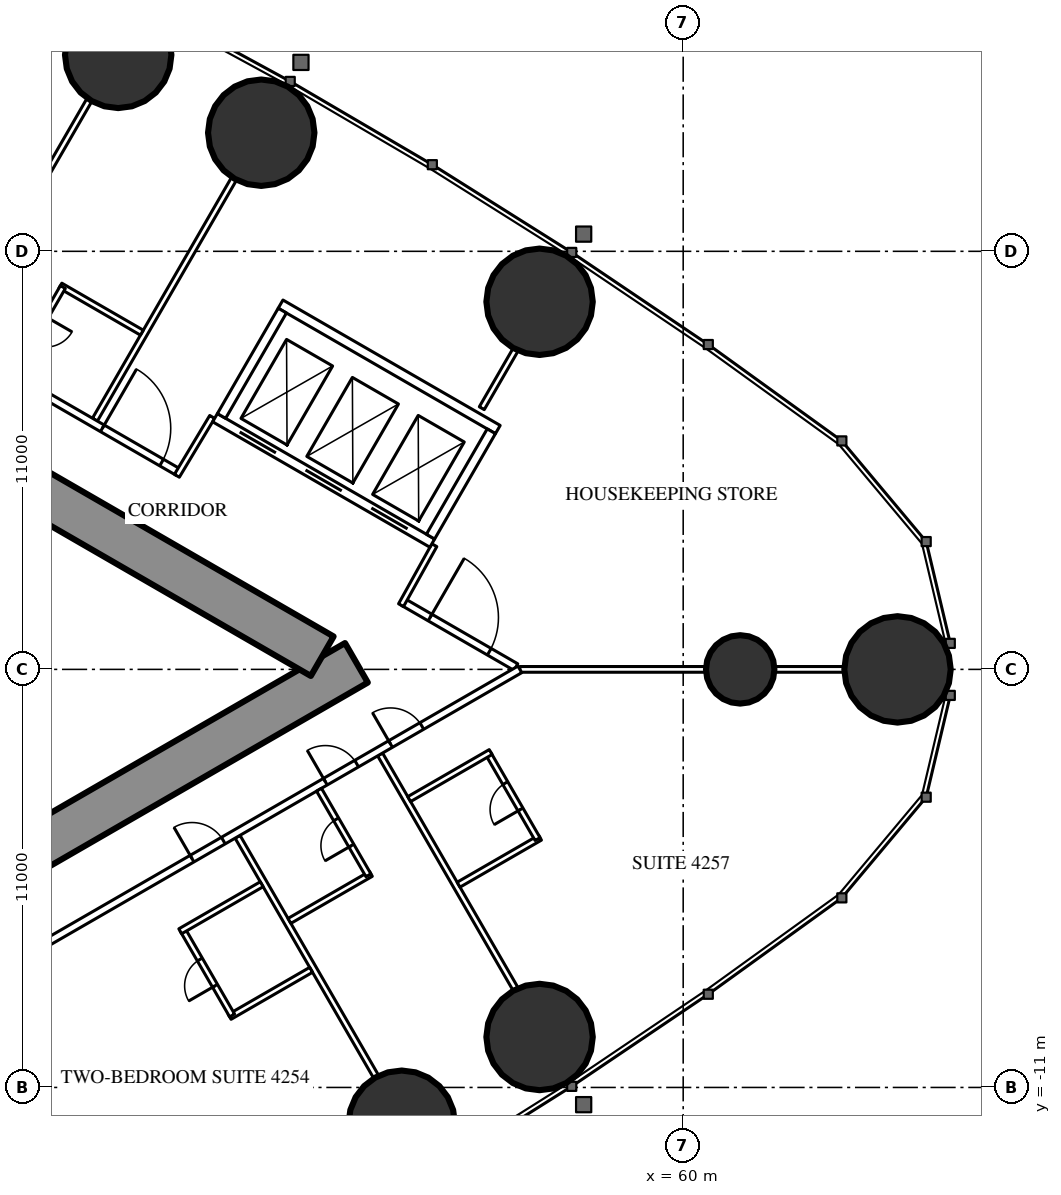
"""IFC4 building model, lengths in metres.
Left out: names, types, materials, properties, quantities, classifications, styles, units other than length and angle.
Written with IfcOpenShell. Run it as: python <this file> out.ifc"""

import sys

from ifc_helpers import new_model, si_unit, direction, frame, frame_2d, origin, origin_2d, place, context, subcontext, project, spatial, rectangle, circle, extrude, element, fill, save


model = new_model("IFC4")
c1 = context("Model", 3, precision=1e-05, world=origin(), true_north=direction((0.0, 1.0)))
c2 = subcontext(c1, "Body", "Model", "MODEL_VIEW")
j1 = project(units=[si_unit("LENGTHUNIT", "METRE"), si_unit("PLANEANGLEUNIT", "RADIAN")], contexts=[c1])
p1 = place(None, origin())
s1 = spatial("IfcSite", under=j1, at=p1, CompositionType="ELEMENT")
p2 = place(p1, origin())
s2 = spatial("IfcBuilding", under=s1, at=p2, CompositionType="ELEMENT")
p3 = place(p2, frame((0.0, 0.0, 159.8)))
s3 = spatial("IfcBuildingStorey", under=s2, at=p3, CompositionType="ELEMENT", Elevation=159.8)
for number, where, z_axis, x_axis in (
    (1, (65.64, 0.0, 0.0), (0.0, 0.0, 1.0), (1.0, 0.0, 0.0)),
    (2, (56.221, 9.672, 0.0), (0.0, 0.0, 1.0), (1.0, 0.0, 0.0)),
    (3, (48.897, 14.121, 0.0), (0.0, 0.0, 1.0), (1.0, 0.0, 0.0)),
    (4, (45.134, 16.168, 0.0), (0.0, 0.0, 1.0), (1.0, 0.0, 0.0)),
    (5, (52.594, -11.955, 0.0), (0.0, 0.0, 1.0), (1.0, 0.0, 0.0)),
    (6, (56.221, -9.672, 0.0), (0.0, 0.0, 1.0), (1.0, 0.0, 0.0)),
):
    element("IfcColumn", number, at=place(p3, frame(where, z_axis=z_axis, x_axis=x_axis)), inside=s3, PredefinedType="COLUMN", context=c2, shape_type="SweptSolid", body=[
        extrude(circle(Radius=1.4, at=origin_2d()), origin(), (0.0, 0.0, 1.0), 3.5),
    ])
p4 = place(p3, frame((61.5, 0.0, 0.0), z_axis=(0.0, 0.0, 1.0), x_axis=(1.0, 0.0, 0.0)))
e7 = element("IfcColumn", 7, at=p4, inside=s3, PredefinedType="COLUMN", context=c2, shape_type="SweptSolid", body=[
    extrude(circle(Radius=0.9, at=origin_2d()), origin(), (0.0, 0.0, 1.0), 3.5),
])
p5 = place(p3, frame((27.2, -13.8, 0.0), z_axis=(0.0, 0.0, 1.0), x_axis=(0.866027159892, 0.499996958321, 0.0)))
e8 = element("IfcWall", 8, at=p5, inside=s3, PredefinedType="SHEAR", context=c2, shape_type="SweptSolid", body=[
    extrude(rectangle(XDim=27.947, YDim=1.2, at=frame_2d((13.973, 0.0))), origin(), (0.0, 0.0, 1.0), 3.5),
])
p6 = place(p5, frame((4.6, 0.0, 0.0)))
e9 = element("IfcOpeningElement", 9, at=p6, cuts=e8, PredefinedType="OPENING", context=c2, shape_type="SweptSolid", body=[
    extrude(rectangle(XDim=1.0, YDim=2.2, at=frame_2d((0.5, 1.1))), frame((0.0, 0.61, 0.0), z_axis=(0.0, -1.0, 0.0), x_axis=(1.0, 0.0, 0.0)), (0.0, 0.0, 1.0), 1.22),
])
p7 = place(p5, frame((13.395, 0.0, 0.0)))
e10 = element("IfcOpeningElement", 10, at=p7, cuts=e8, PredefinedType="OPENING", context=c2, shape_type="SweptSolid", body=[
    extrude(rectangle(XDim=1.8, YDim=2.2, at=frame_2d((0.9, 1.1))), frame((0.0, 0.61, 0.0), z_axis=(0.0, -1.0, 0.0), x_axis=(1.0, 0.0, 0.0)), (0.0, 0.0, 1.0), 1.22),
])
p8 = place(p3, frame((27.2, 13.8, 0.0), z_axis=(0.0, 0.0, 1.0), x_axis=(0.866024515034, -0.500001539357, 0.0)))
e11 = element("IfcWall", 11, at=p8, inside=s3, PredefinedType="SHEAR", context=c2, shape_type="SweptSolid", body=[
    extrude(rectangle(XDim=26.907, YDim=1.2, at=frame_2d((13.454, 0.0))), origin(), (0.0, 0.0, 1.0), 3.5),
])
p9 = place(p8, frame((4.6, 0.0, 0.0)))
e12 = element("IfcOpeningElement", 12, at=p9, cuts=e11, PredefinedType="OPENING", context=c2, shape_type="SweptSolid", body=[
    extrude(rectangle(XDim=1.0, YDim=2.2, at=frame_2d((0.5, 1.1))), frame((0.0, 0.61, 0.0), z_axis=(0.0, -1.0, 0.0), x_axis=(1.0, 0.0, 0.0)), (0.0, 0.0, 1.0), 1.22),
])
p10 = place(p8, frame((13.395, 0.0, 0.0)))
e13 = element("IfcOpeningElement", 13, at=p10, cuts=e11, PredefinedType="OPENING", context=c2, shape_type="SweptSolid", body=[
    extrude(rectangle(XDim=1.8, YDim=2.2, at=frame_2d((0.9, 1.1))), frame((0.0, 0.61, 0.0), z_axis=(0.0, -1.0, 0.0), x_axis=(1.0, 0.0, 0.0)), (0.0, 0.0, 1.0), 1.22),
])
p11 = place(p3, frame((40.769, -8.737, 0.0), z_axis=(0.0, 0.0, 1.0), x_axis=(0.500013115284, -0.866017831539, 0.0)))
e14 = element("IfcWall", 14, at=p11, inside=s3, PredefinedType="PARTITIONING", context=c2, shape_type="SweptSolid", body=[
    extrude(rectangle(XDim=7.198, YDim=0.15, at=frame_2d((3.599, 0.0))), origin(), (0.0, 0.0, 1.0), 2.3),
])
p12 = place(p3, frame((48.275, -4.404, 0.0), z_axis=(0.0, 0.0, 1.0), x_axis=(0.500006004368, -0.866021937133, 0.0)))
e15 = element("IfcWall", 15, at=p12, inside=s3, PredefinedType="PARTITIONING", context=c2, shape_type="SweptSolid", body=[
    extrude(rectangle(XDim=7.279, YDim=0.15, at=frame_2d((3.64, 0.0))), origin(), (0.0, 0.0, 1.0), 2.3),
])
p13 = place(p3, frame((52.025, -2.238, 0.0), z_axis=(0.0, 0.0, 1.0), x_axis=(0.499983785035, -0.866034765296, 0.0)))
e16 = element("IfcWall", 16, at=p13, inside=s3, PredefinedType="PARTITIONING", context=c2, shape_type="SweptSolid", body=[
    extrude(rectangle(XDim=7.116, YDim=0.15, at=frame_2d((3.558, 0.0))), origin(), (0.0, 0.0, 1.0), 2.3),
])
p14 = place(p3, frame((40.769, 8.737, 0.0), z_axis=(0.0, 0.0, 1.0), x_axis=(0.500013115284, 0.866017831539, 0.0)))
e17 = element("IfcWall", 17, at=p14, inside=s3, PredefinedType="PARTITIONING", context=c2, shape_type="SweptSolid", body=[
    extrude(rectangle(XDim=7.198, YDim=0.15, at=frame_2d((3.599, 0.0))), origin(), (0.0, 0.0, 1.0), 2.3),
])
p15 = place(p3, frame((44.521, 6.571, 0.0), z_axis=(0.0, 0.0, 1.0), x_axis=(0.500020376429, 0.866013639128, 0.0)))
e18 = element("IfcWall", 18, at=p15, inside=s3, PredefinedType="PARTITIONING", context=c2, shape_type="SweptSolid", body=[
    extrude(rectangle(XDim=7.306, YDim=0.15, at=frame_2d((3.653, 0.0))), origin(), (0.0, 0.0, 1.0), 2.3),
])
p16 = place(p3, frame((55.702, 0.0, 0.0), z_axis=(0.0, 0.0, 1.0), x_axis=(1.0, 0.0, 0.0)))
e19 = element("IfcWall", 19, at=p16, inside=s3, PredefinedType="PARTITIONING", context=c2, shape_type="SweptSolid", body=[
    extrude(rectangle(XDim=8.518, YDim=0.15, at=frame_2d((4.259, 0.0))), origin(), (0.0, 0.0, 1.0), 2.3),
])
p17 = place(p3, frame((54.7, 6.872, 0.0), z_axis=(0.0, 0.0, 1.0), x_axis=(0.499989690894, 0.866031355668, 0.0)))
e20 = element("IfcWall", 20, at=p17, inside=s3, PredefinedType="PARTITIONING", context=c2, shape_type="SweptSolid", body=[
    extrude(rectangle(XDim=1.766, YDim=0.15, at=frame_2d((0.883, 0.0))), origin(), (0.0, 0.0, 1.0), 3.25),
])
p18 = place(p3, frame((36.834, 10.894, 0.0), z_axis=(0.0, 0.0, 1.0), x_axis=(0.866031655879, -0.499989170898, 0.0)))
e21 = element("IfcWall", 21, at=p18, inside=s3, PredefinedType="PARTITIONING", context=c2, shape_type="SweptSolid", body=[
    extrude(rectangle(XDim=11.41, YDim=0.2, at=frame_2d((5.705, 0.0))), origin(), (0.0, 0.0, 1.0), 3.25),
])
p19 = place(p18, frame((5.144, 0.0, 0.0)))
e22 = element("IfcOpeningElement", 22, at=p19, cuts=e21, PredefinedType="OPENING", context=c2, shape_type="SweptSolid", body=[
    extrude(rectangle(XDim=0.95, YDim=2.2, at=frame_2d((0.475, 1.1))), frame((0.0, 0.11, 0.0), z_axis=(0.0, -1.0, 0.0), x_axis=(1.0, 0.0, 0.0)), (0.0, 0.0, 1.0), 0.22),
])
p20 = place(p18, frame((3.161, 0.0, 0.0)))
e23 = element("IfcOpeningElement", 23, at=p20, cuts=e21, PredefinedType="OPENING", context=c2, shape_type="SweptSolid", body=[
    extrude(rectangle(XDim=0.95, YDim=2.2, at=frame_2d((0.475, 1.1))), frame((0.0, 0.11, 0.0), z_axis=(0.0, -1.0, 0.0), x_axis=(1.0, 0.0, 0.0)), (0.0, 0.0, 1.0), 0.22),
])
p21 = place(p18, frame((9.102, 0.0, 0.0)))
e24 = element("IfcOpeningElement", 24, at=p21, cuts=e21, PredefinedType="OPENING", context=c2, shape_type="SweptSolid", body=[
    extrude(rectangle(XDim=1.8, YDim=2.2, at=frame_2d((0.9, 1.1))), frame((0.0, 0.11, 0.0), z_axis=(0.0, -1.0, 0.0), x_axis=(1.0, 0.0, 0.0)), (0.0, 0.0, 1.0), 0.22),
])
p22 = place(p3, frame((52.639, 1.769, 0.0), z_axis=(0.0, 0.0, 1.0), x_axis=(0.866027340901, -0.4999966448, 0.0)))
e25 = element("IfcWall", 25, at=p22, inside=s3, PredefinedType="PARTITIONING", context=c2, shape_type="SweptSolid", body=[
    extrude(rectangle(XDim=3.417, YDim=0.2, at=frame_2d((1.708, 0.0))), origin(), (0.0, 0.0, 1.0), 3.25),
])
p23 = place(p22, frame((0.809, 0.0, 0.0)))
e26 = element("IfcOpeningElement", 26, at=p23, cuts=e25, PredefinedType="OPENING", context=c2, shape_type="SweptSolid", body=[
    extrude(rectangle(XDim=1.8, YDim=2.2, at=frame_2d((0.9, 1.1))), frame((0.0, 0.11, 0.0), z_axis=(0.0, -1.0, 0.0), x_axis=(1.0, 0.0, 0.0)), (0.0, 0.0, 1.0), 0.22),
])
p24 = place(p3, frame((52.576, 1.689, 0.0), z_axis=(0.0, 0.0, 1.0), x_axis=(0.485424724123, 0.874278466629, 0.0)))
e27 = element("IfcWall", 27, at=p24, inside=s3, PredefinedType="PARTITIONING", context=c2, shape_type="SweptSolid", body=[
    extrude(rectangle(XDim=1.805, YDim=0.15, at=frame_2d((0.903, 0.0))), origin(), (0.0, 0.0, 1.0), 3.25),
])
p25 = place(p3, frame((47.606, 6.643, 0.0), z_axis=(0.0, 0.0, 1.0), x_axis=(-0.514237157483, -0.857648031458, 0.0)))
e28 = element("IfcWall", 28, at=p25, inside=s3, PredefinedType="PARTITIONING", context=c2, shape_type="SweptSolid", body=[
    extrude(rectangle(XDim=1.805, YDim=0.15, at=frame_2d((0.902, 0.0))), origin(), (0.0, 0.0, 1.0), 3.25),
])
p26 = place(p3, frame((40.741, -8.638, 0.0), z_axis=(0.0, 0.0, 1.0), x_axis=(0.866022967338, 0.500004220025, 0.0)))
e29 = element("IfcWall", 29, at=p26, inside=s3, PredefinedType="PARTITIONING", context=c2, shape_type="SweptSolid", body=[
    extrude(rectangle(XDim=17.276, YDim=0.2, at=frame_2d((8.638, 0.0))), origin(), (0.0, 0.0, 1.0), 3.25),
])
p27 = place(p26, frame((7.316, 0.0, 0.0)))
e30 = element("IfcOpeningElement", 30, at=p27, cuts=e29, PredefinedType="OPENING", context=c2, shape_type="SweptSolid", body=[
    extrude(rectangle(XDim=0.95, YDim=2.2, at=frame_2d((0.475, 1.1))), frame((0.0, 0.11, 0.0), z_axis=(0.0, -1.0, 0.0), x_axis=(1.0, 0.0, 0.0)), (0.0, 0.0, 1.0), 0.22),
])
p28 = place(p26, frame((11.366, 0.0, 0.0)))
e31 = element("IfcOpeningElement", 31, at=p28, cuts=e29, PredefinedType="OPENING", context=c2, shape_type="SweptSolid", body=[
    extrude(rectangle(XDim=0.95, YDim=2.2, at=frame_2d((0.475, 1.1))), frame((0.0, 0.11, 0.0), z_axis=(0.0, -1.0, 0.0), x_axis=(1.0, 0.0, 0.0)), (0.0, 0.0, 1.0), 0.22),
])
p29 = place(p26, frame((13.347, 0.0, 0.0)))
e32 = element("IfcOpeningElement", 32, at=p29, cuts=e29, PredefinedType="OPENING", context=c2, shape_type="SweptSolid", body=[
    extrude(rectangle(XDim=0.95, YDim=2.2, at=frame_2d((0.475, 1.1))), frame((0.0, 0.11, 0.0), z_axis=(0.0, -1.0, 0.0), x_axis=(1.0, 0.0, 0.0)), (0.0, 0.0, 1.0), 0.22),
])
p30 = place(p3, frame((48.066, -9.143, 0.0), z_axis=(0.0, 0.0, 1.0), x_axis=(0.866006523861, 0.500032699561, 0.0)))
e33 = element("IfcWall", 33, at=p30, inside=s3, PredefinedType="PARTITIONING", context=c2, shape_type="SweptSolid", body=[
    extrude(rectangle(XDim=2.475, YDim=0.15, at=frame_2d((1.237, 0.0))), origin(), (0.0, 0.0, 1.0), 3.25),
])
p31 = place(p3, frame((46.831, -6.854, 0.0), z_axis=(0.0, 0.0, 1.0), x_axis=(0.500006934395, -0.866021400173, 0.0)))
e34 = element("IfcWall", 34, at=p31, inside=s3, PredefinedType="PARTITIONING", context=c2, shape_type="SweptSolid", body=[
    extrude(rectangle(XDim=2.6, YDim=0.15, at=frame_2d((1.3, 0.0))), origin(), (0.0, 0.0, 1.0), 3.25),
])
p32 = place(p31, frame((0.9, 0.0, 0.0)))
e35 = element("IfcOpeningElement", 35, at=p32, cuts=e34, PredefinedType="OPENING", context=c2, shape_type="SweptSolid", body=[
    extrude(rectangle(XDim=0.8, YDim=2.2, at=frame_2d((0.4, 1.1))), frame((0.0, 0.085, 0.0), z_axis=(0.0, -1.0, 0.0), x_axis=(1.0, 0.0, 0.0)), (0.0, 0.0, 1.0), 0.17),
])
for number, where, z_axis, x_axis in (
    (36, (46.766, -6.891, 0.0), (0.0, 0.0, 1.0), (0.866, 0.5, 0.0)),
    (37, (49.64, -6.618, 0.0), (0.0, 0.0, 1.0), (0.866, 0.5, 0.0)),
):
    element("IfcWall", number, at=place(p3, frame(where, z_axis=z_axis, x_axis=x_axis)), inside=s3, PredefinedType="PARTITIONING", context=c2, shape_type="SweptSolid", body=[
        extrude(rectangle(XDim=2.475, YDim=0.15, at=frame_2d((1.237, 0.0))), origin(), (0.0, 0.0, 1.0), 3.25),
    ])
p33 = place(p3, frame((50.418, -3.166, 0.0), z_axis=(0.0, 0.0, 1.0), x_axis=(0.499936506574, -0.866062058628, 0.0)))
e38 = element("IfcWall", 38, at=p33, inside=s3, PredefinedType="PARTITIONING", context=c2, shape_type="SweptSolid", body=[
    extrude(rectangle(XDim=2.6, YDim=0.15, at=frame_2d((1.3, 0.0))), origin(), (0.0, 0.0, 1.0), 3.25),
])
p34 = place(p33, frame((0.9, 0.0, 0.0)))
e39 = element("IfcOpeningElement", 39, at=p34, cuts=e38, PredefinedType="OPENING", context=c2, shape_type="SweptSolid", body=[
    extrude(rectangle(XDim=0.8, YDim=2.2, at=frame_2d((0.4, 1.1))), frame((0.0, 0.085, 0.0), z_axis=(0.0, -1.0, 0.0), x_axis=(1.0, 0.0, 0.0)), (0.0, 0.0, 1.0), 0.17),
])
p35 = place(p3, frame((54.09, -5.665, 0.0), z_axis=(0.0, 0.0, 1.0), x_axis=(0.866006523861, 0.500032699561, 0.0)))
e40 = element("IfcWall", 40, at=p35, inside=s3, PredefinedType="PARTITIONING", context=c2, shape_type="SweptSolid", body=[
    extrude(rectangle(XDim=2.475, YDim=0.15, at=frame_2d((1.237, 0.0))), origin(), (0.0, 0.0, 1.0), 3.25),
])
p36 = place(p3, frame((54.869, -2.213, 0.0), z_axis=(0.0, 0.0, 1.0), x_axis=(0.500047596559, -0.865997922154, 0.0)))
e41 = element("IfcWall", 41, at=p36, inside=s3, PredefinedType="PARTITIONING", context=c2, shape_type="SweptSolid", body=[
    extrude(rectangle(XDim=2.6, YDim=0.15, at=frame_2d((1.3, 0.0))), origin(), (0.0, 0.0, 1.0), 3.25),
])
p37 = place(p36, frame((0.9, 0.0, 0.0)))
e42 = element("IfcOpeningElement", 42, at=p37, cuts=e41, PredefinedType="OPENING", context=c2, shape_type="SweptSolid", body=[
    extrude(rectangle(XDim=0.8, YDim=2.2, at=frame_2d((0.4, 1.1))), frame((0.0, 0.085, 0.0), z_axis=(0.0, -1.0, 0.0), x_axis=(1.0, 0.0, 0.0)), (0.0, 0.0, 1.0), 0.17),
])
p38 = place(p3, frame((52.79, -3.413, 0.0), z_axis=(0.0, 0.0, 1.0), x_axis=(0.866006523861, 0.500032699561, 0.0)))
e43 = element("IfcWall", 43, at=p38, inside=s3, PredefinedType="PARTITIONING", context=c2, shape_type="SweptSolid", body=[
    extrude(rectangle(XDim=2.475, YDim=0.15, at=frame_2d((1.237, 0.0))), origin(), (0.0, 0.0, 1.0), 3.25),
])
p39 = place(p3, frame((43.613, 10.097, 0.0), z_axis=(0.0, 0.0, 1.0), x_axis=(0.866031185235, -0.4999899861, 0.0)))
e44 = element("IfcWall", 44, at=p39, inside=s3, PredefinedType="PARTITIONING", context=c2, shape_type="SweptSolid", body=[
    extrude(rectangle(XDim=2.475, YDim=0.15, at=frame_2d((1.238, 0.0))), origin(), (0.0, 0.0, 1.0), 3.25),
])
p40 = place(p3, frame((42.378, 7.808, 0.0), z_axis=(0.0, 0.0, 1.0), x_axis=(0.500006934395, 0.866021400173, 0.0)))
e45 = element("IfcWall", 45, at=p40, inside=s3, PredefinedType="PARTITIONING", context=c2, shape_type="SweptSolid", body=[
    extrude(rectangle(XDim=2.6, YDim=0.15, at=frame_2d((1.3, 0.0))), origin(), (0.0, 0.0, 1.0), 3.25),
])
p41 = place(p40, frame((0.9, 0.0, 0.0)))
e46 = element("IfcOpeningElement", 46, at=p41, cuts=e45, PredefinedType="OPENING", context=c2, shape_type="SweptSolid", body=[
    extrude(rectangle(XDim=0.8, YDim=2.2, at=frame_2d((0.4, 1.1))), frame((0.0, 0.085, 0.0), z_axis=(0.0, -1.0, 0.0), x_axis=(1.0, 0.0, 0.0)), (0.0, 0.0, 1.0), 0.17),
])
p42 = place(p3, frame((47.681, 6.622, 0.0), z_axis=(0.0, 0.0, 1.0), x_axis=(0.86603344179, -0.499986077507, 0.0)))
e47 = element("IfcWall", 47, at=p42, inside=s3, PredefinedType="PARTITIONING", context=c2, shape_type="SweptSolid", body=[
    extrude(rectangle(XDim=6.6, YDim=0.25, at=frame_2d((3.3, 0.0))), origin(), (0.0, 0.0, 1.0), 3.25),
])
p43 = place(p42, frame((0.75, 0.0, 0.0)))
e48 = element("IfcOpeningElement", 48, at=p43, cuts=e47, PredefinedType="OPENING", context=c2, shape_type="SweptSolid", body=[
    extrude(rectangle(XDim=1.1, YDim=2.2, at=frame_2d((0.55, 1.1))), frame((0.0, 0.135, 0.0), z_axis=(0.0, -1.0, 0.0), x_axis=(1.0, 0.0, 0.0)), (0.0, 0.0, 1.0), 0.27),
])
p44 = place(p42, frame((2.75, 0.0, 0.0)))
e49 = element("IfcOpeningElement", 49, at=p44, cuts=e47, PredefinedType="OPENING", context=c2, shape_type="SweptSolid", body=[
    extrude(rectangle(XDim=1.1, YDim=2.2, at=frame_2d((0.55, 1.1))), frame((0.0, 0.135, 0.0), z_axis=(0.0, -1.0, 0.0), x_axis=(1.0, 0.0, 0.0)), (0.0, 0.0, 1.0), 0.27),
])
p45 = place(p42, frame((4.75, 0.0, 0.0)))
e50 = element("IfcOpeningElement", 50, at=p45, cuts=e47, PredefinedType="OPENING", context=c2, shape_type="SweptSolid", body=[
    extrude(rectangle(XDim=1.1, YDim=2.2, at=frame_2d((0.55, 1.1))), frame((0.0, 0.135, 0.0), z_axis=(0.0, -1.0, 0.0), x_axis=(1.0, 0.0, 0.0)), (0.0, 0.0, 1.0), 0.27),
])
p46 = place(p3, frame((49.406, 9.611, 0.0), z_axis=(0.0, 0.0, 1.0), x_axis=(0.86603344179, -0.499986077507, 0.0)))
e51 = element("IfcWall", 51, at=p46, inside=s3, PredefinedType="PARTITIONING", context=c2, shape_type="SweptSolid", body=[
    extrude(rectangle(XDim=6.6, YDim=0.25, at=frame_2d((3.3, 0.0))), origin(), (0.0, 0.0, 1.0), 3.25),
])
p47 = place(p3, frame((47.852, 6.668, 0.0), z_axis=(0.0, 0.0, 1.0), x_axis=(0.499929347863, 0.866066190972, 0.0)))
e52 = element("IfcWall", 52, at=p47, inside=s3, PredefinedType="PARTITIONING", context=c2, shape_type="SweptSolid", body=[
    extrude(rectangle(XDim=3.201, YDim=0.25, at=frame_2d((1.6, 0.0))), origin(), (0.0, 0.0, 1.0), 3.25),
])
p48 = place(p3, frame((53.352, 3.493, 0.0), z_axis=(0.0, 0.0, 1.0), x_axis=(0.499872130319, 0.866099216793, 0.0)))
e53 = element("IfcWall", 53, at=p48, inside=s3, PredefinedType="PARTITIONING", context=c2, shape_type="SweptSolid", body=[
    extrude(rectangle(XDim=3.2, YDim=0.25, at=frame_2d((1.6, 0.0))), origin(), (0.0, 0.0, 1.0), 3.25),
])
p49 = place(p32, origin())
e54 = element("IfcDoor", 54, at=p49, inside=s3, OperationType="SINGLE_SWING_RIGHT", PredefinedType="DOOR", context=c2, shape_type="SweptSolid", body=[
    extrude(rectangle(XDim=0.8, YDim=2.2, at=frame_2d((0.4, 1.1))), frame((0.0, 0.025, 0.0), z_axis=(0.0, -1.0, 0.0), x_axis=(1.0, 0.0, 0.0)), (0.0, 0.0, 1.0), 0.05),
])
fill(e35, e54)
p50 = place(p27, origin())
e55 = element("IfcDoor", 55, at=p50, inside=s3, OperationType="SINGLE_SWING_LEFT", PredefinedType="DOOR", context=c2, shape_type="SweptSolid", body=[
    extrude(rectangle(XDim=0.95, YDim=2.2, at=frame_2d((0.475, 1.1))), frame((0.0, 0.025, 0.0), z_axis=(0.0, -1.0, 0.0), x_axis=(1.0, 0.0, 0.0)), (0.0, 0.0, 1.0), 0.05),
])
fill(e30, e55)
p51 = place(p34, origin())
e56 = element("IfcDoor", 56, at=p51, inside=s3, OperationType="SINGLE_SWING_RIGHT", PredefinedType="DOOR", context=c2, shape_type="SweptSolid", body=[
    extrude(rectangle(XDim=0.8, YDim=2.2, at=frame_2d((0.4, 1.1))), frame((0.0, 0.025, 0.0), z_axis=(0.0, -1.0, 0.0), x_axis=(1.0, 0.0, 0.0)), (0.0, 0.0, 1.0), 0.05),
])
fill(e39, e56)
p52 = place(p28, origin())
e57 = element("IfcDoor", 57, at=p52, inside=s3, OperationType="SINGLE_SWING_LEFT", PredefinedType="DOOR", context=c2, shape_type="SweptSolid", body=[
    extrude(rectangle(XDim=0.95, YDim=2.2, at=frame_2d((0.475, 1.1))), frame((0.0, 0.025, 0.0), z_axis=(0.0, -1.0, 0.0), x_axis=(1.0, 0.0, 0.0)), (0.0, 0.0, 1.0), 0.05),
])
fill(e31, e57)
p53 = place(p37, origin())
e58 = element("IfcDoor", 58, at=p53, inside=s3, OperationType="SINGLE_SWING_RIGHT", PredefinedType="DOOR", context=c2, shape_type="SweptSolid", body=[
    extrude(rectangle(XDim=0.8, YDim=2.2, at=frame_2d((0.4, 1.1))), frame((0.0, 0.025, 0.0), z_axis=(0.0, -1.0, 0.0), x_axis=(1.0, 0.0, 0.0)), (0.0, 0.0, 1.0), 0.05),
])
fill(e42, e58)
p54 = place(p29, origin())
e59 = element("IfcDoor", 59, at=p54, inside=s3, OperationType="SINGLE_SWING_LEFT", PredefinedType="DOOR", context=c2, shape_type="SweptSolid", body=[
    extrude(rectangle(XDim=0.95, YDim=2.2, at=frame_2d((0.475, 1.1))), frame((0.0, 0.025, 0.0), z_axis=(0.0, -1.0, 0.0), x_axis=(1.0, 0.0, 0.0)), (0.0, 0.0, 1.0), 0.05),
])
fill(e32, e59)
p55 = place(p23, origin())
e60 = element("IfcDoor", 60, at=p55, inside=s3, OperationType="DOUBLE_DOOR_SINGLE_SWING", PredefinedType="DOOR", context=c2, shape_type="SweptSolid", body=[
    extrude(rectangle(XDim=1.8, YDim=2.2, at=frame_2d((0.9, 1.1))), frame((0.0, 0.025, 0.0), z_axis=(0.0, -1.0, 0.0), x_axis=(1.0, 0.0, 0.0)), (0.0, 0.0, 1.0), 0.05),
])
fill(e26, e60)
p56 = place(p21, origin())
e61 = element("IfcDoor", 61, at=p56, inside=s3, OperationType="DOUBLE_DOOR_SINGLE_SWING", PredefinedType="DOOR", context=c2, shape_type="SweptSolid", body=[
    extrude(rectangle(XDim=1.8, YDim=2.2, at=frame_2d((0.9, 1.1))), frame((0.0, 0.025, 0.0), z_axis=(0.0, -1.0, 0.0), x_axis=(1.0, 0.0, 0.0)), (0.0, 0.0, 1.0), 0.05),
])
fill(e24, e61)
p57 = place(p43, origin())
e62 = element("IfcDoor", 62, at=p57, inside=s3, OperationType="DOUBLE_DOOR_SLIDING", PredefinedType="USERDEFINED", context=c2, shape_type="SweptSolid", body=[
    extrude(rectangle(XDim=1.1, YDim=2.2, at=frame_2d((0.55, 1.1))), frame((0.0, 0.025, 0.0), z_axis=(0.0, -1.0, 0.0), x_axis=(1.0, 0.0, 0.0)), (0.0, 0.0, 1.0), 0.05),
])
fill(e48, e62)
p58 = place(p44, origin())
e63 = element("IfcDoor", 63, at=p58, inside=s3, OperationType="DOUBLE_DOOR_SLIDING", PredefinedType="USERDEFINED", context=c2, shape_type="SweptSolid", body=[
    extrude(rectangle(XDim=1.1, YDim=2.2, at=frame_2d((0.55, 1.1))), frame((0.0, 0.025, 0.0), z_axis=(0.0, -1.0, 0.0), x_axis=(1.0, 0.0, 0.0)), (0.0, 0.0, 1.0), 0.05),
])
fill(e49, e63)
p59 = place(p45, origin())
e64 = element("IfcDoor", 64, at=p59, inside=s3, OperationType="DOUBLE_DOOR_SLIDING", PredefinedType="USERDEFINED", context=c2, shape_type="SweptSolid", body=[
    extrude(rectangle(XDim=1.1, YDim=2.2, at=frame_2d((0.55, 1.1))), frame((0.0, 0.025, 0.0), z_axis=(0.0, -1.0, 0.0), x_axis=(1.0, 0.0, 0.0)), (0.0, 0.0, 1.0), 0.05),
])
fill(e50, e64)
save(model, sys.argv[1])
